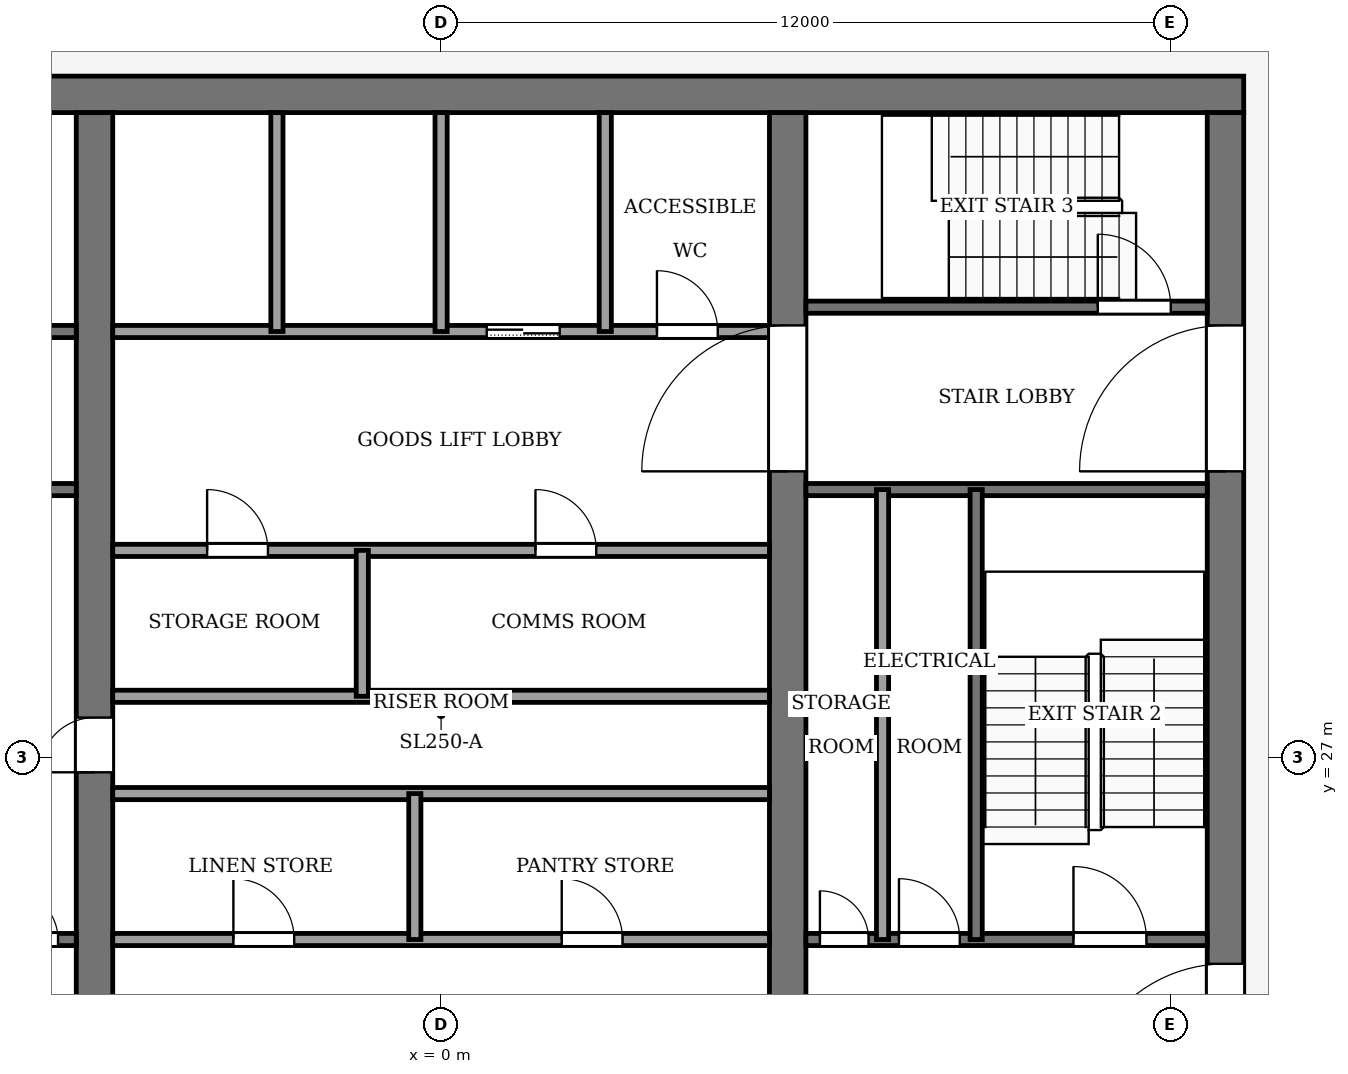
"""IFC4 building model, lengths in metres.
Left out: names, types, materials, properties, quantities, classifications, styles, units other than length and angle.
Written with IfcOpenShell. Run it as: python <this file> out.ifc"""

import sys

from ifc_helpers import new_model, si_unit, direction, frame, frame_2d, origin, place, context, subcontext, project, spatial, rectangle, extrude, element, fill, save


model = new_model("IFC4")
c1 = context("Model", 3, precision=1e-05, world=origin(), true_north=direction((0.0, 1.0)))
c2 = subcontext(c1, "Body", "Model", "MODEL_VIEW")
j1 = project(units=[si_unit("LENGTHUNIT", "METRE"), si_unit("PLANEANGLEUNIT", "RADIAN")], contexts=[c1])
p1 = place(None, origin())
s1 = spatial("IfcSite", under=j1, at=p1, CompositionType="ELEMENT")
p2 = place(p1, origin())
s2 = spatial("IfcBuilding", under=s1, at=p2, CompositionType="ELEMENT")
p3 = place(p2, frame((0.0, 0.0, 322.0)))
s3 = spatial("IfcBuildingStorey", under=s2, at=p3, CompositionType="ELEMENT", Elevation=322.0)
p4 = place(p3, frame((-13.2, 37.9, -0.13), z_axis=(0.0, 0.0, 1.0), x_axis=(1.0, 0.0, 0.0)))
e1 = element("IfcWall", 1, at=p4, inside=s3, PredefinedType="SHEAR", context=c2, shape_type="SweptSolid", body=[
    extrude(rectangle(XDim=26.4, YDim=0.6, at=frame_2d((13.2, 0.0))), origin(), (0.0, 0.0, 1.0), 4.0),
])
p5 = place(p3, frame((12.9, 18.4, -0.13), z_axis=(0.0, 0.0, 1.0), x_axis=(0.0, 1.0, 0.0)))
e2 = element("IfcWall", 2, at=p5, inside=s3, PredefinedType="SHEAR", context=c2, shape_type="SweptSolid", body=[
    extrude(rectangle(XDim=19.2, YDim=0.6, at=frame_2d((9.6, 0.0))), origin(), (0.0, 0.0, 1.0), 4.0),
])
p6 = place(p5, frame((2.8, 0.0, 0.13)))
e3 = element("IfcOpeningElement", 3, at=p6, cuts=e2, PredefinedType="OPENING", context=c2, shape_type="SweptSolid", body=[
    extrude(rectangle(XDim=2.4, YDim=2.4, at=frame_2d((1.2, 1.2))), frame((0.0, 0.31, 0.0), z_axis=(0.0, -1.0, 0.0), x_axis=(1.0, 0.0, 0.0)), (0.0, 0.0, 1.0), 0.62),
])
p7 = place(p5, frame((13.3, 0.0, 0.13)))
e4 = element("IfcOpeningElement", 4, at=p7, cuts=e2, PredefinedType="OPENING", context=c2, shape_type="SweptSolid", body=[
    extrude(rectangle(XDim=2.4, YDim=2.4, at=frame_2d((1.2, 1.2))), frame((0.0, 0.31, 0.0), z_axis=(0.0, -1.0, 0.0), x_axis=(1.0, 0.0, 0.0)), (0.0, 0.0, 1.0), 0.62),
])
p8 = place(p3, frame((-5.7, 18.4, -0.13), z_axis=(0.0, 0.0, 1.0), x_axis=(0.0, 1.0, 0.0)))
e5 = element("IfcWall", 5, at=p8, inside=s3, PredefinedType="SHEAR", context=c2, shape_type="SweptSolid", body=[
    extrude(rectangle(XDim=19.2, YDim=0.6, at=frame_2d((9.6, 0.0))), origin(), (0.0, 0.0, 1.0), 4.0),
])
p9 = place(p8, frame((8.35, 0.0, 0.13)))
e6 = element("IfcOpeningElement", 6, at=p9, cuts=e5, PredefinedType="OPENING", context=c2, shape_type="SweptSolid", body=[
    extrude(rectangle(XDim=0.9, YDim=2.1, at=frame_2d((0.45, 1.05))), frame((0.0, 0.31, 0.0), z_axis=(0.0, -1.0, 0.0), x_axis=(1.0, 0.0, 0.0)), (0.0, 0.0, 1.0), 0.62),
])
p10 = place(p3, frame((5.7, 18.4, -0.13), z_axis=(0.0, 0.0, 1.0), x_axis=(0.0, 1.0, 0.0)))
e7 = element("IfcWall", 7, at=p10, inside=s3, PredefinedType="SHEAR", context=c2, shape_type="SweptSolid", body=[
    extrude(rectangle(XDim=19.2, YDim=0.6, at=frame_2d((9.6, 0.0))), origin(), (0.0, 0.0, 1.0), 4.0),
])
p11 = place(p10, frame((13.3, 0.0, 0.13)))
e8 = element("IfcOpeningElement", 8, at=p11, cuts=e7, PredefinedType="OPENING", context=c2, shape_type="SweptSolid", body=[
    extrude(rectangle(XDim=2.4, YDim=2.4, at=frame_2d((1.2, 1.2))), frame((0.0, 0.31, 0.0), z_axis=(0.0, -1.0, 0.0), x_axis=(1.0, 0.0, 0.0)), (0.0, 0.0, 1.0), 0.62),
])
p12 = place(p3, frame((-12.6, 24.0, 0.0), z_axis=(0.0, 0.0, 1.0), x_axis=(1.0, 0.0, 0.0)))
e9 = element("IfcWall", 9, at=p12, inside=s3, PredefinedType="PARTITIONING", context=c2, shape_type="SweptSolid", body=[
    extrude(rectangle(XDim=6.6, YDim=0.2, at=frame_2d((3.3, 0.0))), origin(), (0.0, 0.0, 1.0), 3.87),
])
p13 = place(p12, frame((4.1, 0.0, 0.0)))
e10 = element("IfcOpeningElement", 10, at=p13, cuts=e9, PredefinedType="OPENING", context=c2, shape_type="SweptSolid", body=[
    extrude(rectangle(XDim=0.8, YDim=2.1, at=frame_2d((0.4, 1.05))), frame((0.0, 0.11, 0.0), z_axis=(0.0, -1.0, 0.0), x_axis=(1.0, 0.0, 0.0)), (0.0, 0.0, 1.0), 0.22),
])
p14 = place(p12, frame((5.5, 0.0, 0.0)))
e11 = element("IfcOpeningElement", 11, at=p14, cuts=e9, PredefinedType="OPENING", context=c2, shape_type="SweptSolid", body=[
    extrude(rectangle(XDim=0.8, YDim=2.1, at=frame_2d((0.4, 1.05))), frame((0.0, 0.11, 0.0), z_axis=(0.0, -1.0, 0.0), x_axis=(1.0, 0.0, 0.0)), (0.0, 0.0, 1.0), 0.22),
])
p15 = place(p3, frame((-5.4, 24.0, 0.0), z_axis=(0.0, 0.0, 1.0), x_axis=(1.0, 0.0, 0.0)))
e12 = element("IfcWall", 12, at=p15, inside=s3, PredefinedType="PARTITIONING", context=c2, shape_type="SweptSolid", body=[
    extrude(rectangle(XDim=10.8, YDim=0.2, at=frame_2d((5.4, 0.0))), origin(), (0.0, 0.0, 1.0), 3.87),
])
p16 = place(p15, frame((1.984, 0.0, 0.0)))
e13 = element("IfcOpeningElement", 13, at=p16, cuts=e12, PredefinedType="OPENING", context=c2, shape_type="SweptSolid", body=[
    extrude(rectangle(XDim=1.0, YDim=2.1, at=frame_2d((0.5, 1.05))), frame((0.0, 0.11, 0.0), z_axis=(0.0, -1.0, 0.0), x_axis=(1.0, 0.0, 0.0)), (0.0, 0.0, 1.0), 0.22),
])
p17 = place(p15, frame((7.384, 0.0, 0.0)))
e14 = element("IfcOpeningElement", 14, at=p17, cuts=e12, PredefinedType="OPENING", context=c2, shape_type="SweptSolid", body=[
    extrude(rectangle(XDim=1.0, YDim=2.1, at=frame_2d((0.5, 1.05))), frame((0.0, 0.11, 0.0), z_axis=(0.0, -1.0, 0.0), x_axis=(1.0, 0.0, 0.0)), (0.0, 0.0, 1.0), 0.22),
])
p18 = place(p3, frame((6.0, 24.0, 0.0), z_axis=(0.0, 0.0, 1.0), x_axis=(1.0, 0.0, 0.0)))
e15 = element("IfcWall", 15, at=p18, inside=s3, PredefinedType="PARTITIONING", context=c2, shape_type="SweptSolid", body=[
    extrude(rectangle(XDim=6.6, YDim=0.2, at=frame_2d((3.3, 0.0))), origin(), (0.0, 0.0, 1.0), 3.87),
])
p19 = place(p18, frame((0.23, 0.0, 0.0)))
e16 = element("IfcOpeningElement", 16, at=p19, cuts=e15, PredefinedType="OPENING", context=c2, shape_type="SweptSolid", body=[
    extrude(rectangle(XDim=0.8, YDim=2.1, at=frame_2d((0.4, 1.05))), frame((0.0, 0.11, 0.0), z_axis=(0.0, -1.0, 0.0), x_axis=(1.0, 0.0, 0.0)), (0.0, 0.0, 1.0), 0.22),
])
p20 = place(p18, frame((1.53, 0.0, 0.0)))
e17 = element("IfcOpeningElement", 17, at=p20, cuts=e15, PredefinedType="OPENING", context=c2, shape_type="SweptSolid", body=[
    extrude(rectangle(XDim=1.0, YDim=2.1, at=frame_2d((0.5, 1.05))), frame((0.0, 0.11, 0.0), z_axis=(0.0, -1.0, 0.0), x_axis=(1.0, 0.0, 0.0)), (0.0, 0.0, 1.0), 0.22),
])
p21 = place(p18, frame((4.4, 0.0, 0.0)))
e18 = element("IfcOpeningElement", 18, at=p21, cuts=e15, PredefinedType="OPENING", context=c2, shape_type="SweptSolid", body=[
    extrude(rectangle(XDim=1.2, YDim=2.2, at=frame_2d((0.6, 1.1))), frame((0.0, 0.11, 0.0), z_axis=(0.0, -1.0, 0.0), x_axis=(1.0, 0.0, 0.0)), (0.0, 0.0, 1.0), 0.22),
])
for number, where, z_axis, x_axis in (
    (19, (-5.4, 26.4, 0.0), (0.0, 0.0, 1.0), (1.0, 0.0, 0.0)),
    (20, (-5.4, 28.0, 0.0), (0.0, 0.0, 1.0), (1.0, 0.0, 0.0)),
):
    element("IfcWall", number, at=place(p3, frame(where, z_axis=z_axis, x_axis=x_axis)), inside=s3, PredefinedType="PARTITIONING", context=c2, shape_type="SweptSolid", body=[
        extrude(rectangle(XDim=10.8, YDim=0.2, at=frame_2d((5.4, 0.0))), origin(), (0.0, 0.0, 1.0), 3.87),
    ])
p22 = place(p3, frame((-5.4, 30.4, 0.0), z_axis=(0.0, 0.0, 1.0), x_axis=(1.0, 0.0, 0.0)))
e21 = element("IfcWall", 21, at=p22, inside=s3, PredefinedType="PARTITIONING", context=c2, shape_type="SweptSolid", body=[
    extrude(rectangle(XDim=10.8, YDim=0.2, at=frame_2d((5.4, 0.0))), origin(), (0.0, 0.0, 1.0), 3.87),
])
p23 = place(p22, frame((1.552, 0.0, 0.0)))
e22 = element("IfcOpeningElement", 22, at=p23, cuts=e21, PredefinedType="OPENING", context=c2, shape_type="SweptSolid", body=[
    extrude(rectangle(XDim=1.0, YDim=2.1, at=frame_2d((0.5, 1.05))), frame((0.0, 0.11, 0.0), z_axis=(0.0, -1.0, 0.0), x_axis=(1.0, 0.0, 0.0)), (0.0, 0.0, 1.0), 0.22),
])
p24 = place(p22, frame((6.952, 0.0, 0.0)))
e23 = element("IfcOpeningElement", 23, at=p24, cuts=e21, PredefinedType="OPENING", context=c2, shape_type="SweptSolid", body=[
    extrude(rectangle(XDim=1.0, YDim=2.1, at=frame_2d((0.5, 1.05))), frame((0.0, 0.11, 0.0), z_axis=(0.0, -1.0, 0.0), x_axis=(1.0, 0.0, 0.0)), (0.0, 0.0, 1.0), 0.22),
])
p25 = place(p3, frame((-12.6, 31.4, 0.0), z_axis=(0.0, 0.0, 1.0), x_axis=(1.0, 0.0, 0.0)))
e24 = element("IfcWall", 24, at=p25, inside=s3, PredefinedType="PARTITIONING", context=c2, shape_type="SweptSolid", body=[
    extrude(rectangle(XDim=6.6, YDim=0.2, at=frame_2d((3.3, 0.0))), origin(), (0.0, 0.0, 1.0), 3.87),
])
p26 = place(p25, frame((1.0, 0.0, 0.0)))
e25 = element("IfcOpeningElement", 25, at=p26, cuts=e24, PredefinedType="OPENING", context=c2, shape_type="SweptSolid", body=[
    extrude(rectangle(XDim=1.2, YDim=2.2, at=frame_2d((0.6, 1.1))), frame((0.0, 0.11, 0.0), z_axis=(0.0, -1.0, 0.0), x_axis=(1.0, 0.0, 0.0)), (0.0, 0.0, 1.0), 0.22),
])
p27 = place(p3, frame((6.0, 31.4, 0.0), z_axis=(0.0, 0.0, 1.0), x_axis=(1.0, 0.0, 0.0)))
e26 = element("IfcWall", 26, at=p27, inside=s3, PredefinedType="PARTITIONING", context=c2, shape_type="SweptSolid", body=[
    extrude(rectangle(XDim=6.6, YDim=0.2, at=frame_2d((3.3, 0.0))), origin(), (0.0, 0.0, 1.0), 3.87),
])
p28 = place(p3, frame((-12.6, 34.0, 0.0), z_axis=(0.0, 0.0, 1.0), x_axis=(1.0, 0.0, 0.0)))
e27 = element("IfcWall", 27, at=p28, inside=s3, PredefinedType="PARTITIONING", context=c2, shape_type="SweptSolid", body=[
    extrude(rectangle(XDim=6.6, YDim=0.2, at=frame_2d((3.3, 0.0))), origin(), (0.0, 0.0, 1.0), 3.87),
])
p29 = place(p28, frame((4.7, 0.0, 0.0)))
e28 = element("IfcOpeningElement", 28, at=p29, cuts=e27, PredefinedType="OPENING", context=c2, shape_type="SweptSolid", body=[
    extrude(rectangle(XDim=1.4, YDim=2.2, at=frame_2d((0.7, 1.1))), frame((0.0, 0.11, 0.0), z_axis=(0.0, -1.0, 0.0), x_axis=(1.0, 0.0, 0.0)), (0.0, 0.0, 1.0), 0.22),
])
p30 = place(p28, frame((2.3, 0.0, 0.0)))
e29 = element("IfcOpeningElement", 29, at=p30, cuts=e27, PredefinedType="OPENING", context=c2, shape_type="SweptSolid", body=[
    extrude(rectangle(XDim=1.4, YDim=2.2, at=frame_2d((0.7, 1.1))), frame((0.0, 0.11, 0.0), z_axis=(0.0, -1.0, 0.0), x_axis=(1.0, 0.0, 0.0)), (0.0, 0.0, 1.0), 0.22),
])
p31 = place(p28, frame((0.45, 0.0, 0.0)))
e30 = element("IfcOpeningElement", 30, at=p31, cuts=e27, PredefinedType="OPENING", context=c2, shape_type="SweptSolid", body=[
    extrude(rectangle(XDim=0.9, YDim=2.1, at=frame_2d((0.45, 1.05))), frame((0.0, 0.11, 0.0), z_axis=(0.0, -1.0, 0.0), x_axis=(1.0, 0.0, 0.0)), (0.0, 0.0, 1.0), 0.22),
])
p32 = place(p3, frame((-5.4, 34.0, 0.0), z_axis=(0.0, 0.0, 1.0), x_axis=(1.0, 0.0, 0.0)))
e31 = element("IfcWall", 31, at=p32, inside=s3, PredefinedType="PARTITIONING", context=c2, shape_type="SweptSolid", body=[
    extrude(rectangle(XDim=10.8, YDim=0.2, at=frame_2d((5.4, 0.0))), origin(), (0.0, 0.0, 1.0), 3.87),
])
p33 = place(p32, frame((6.15, 0.0, 0.0)))
e32 = element("IfcOpeningElement", 32, at=p33, cuts=e31, PredefinedType="OPENING", context=c2, shape_type="SweptSolid", body=[
    extrude(rectangle(XDim=1.2, YDim=2.2, at=frame_2d((0.6, 1.1))), frame((0.0, 0.11, 0.0), z_axis=(0.0, -1.0, 0.0), x_axis=(1.0, 0.0, 0.0)), (0.0, 0.0, 1.0), 0.22),
])
p34 = place(p32, frame((8.95, 0.0, 0.0)))
e33 = element("IfcOpeningElement", 33, at=p34, cuts=e31, PredefinedType="OPENING", context=c2, shape_type="SweptSolid", body=[
    extrude(rectangle(XDim=1.0, YDim=2.1, at=frame_2d((0.5, 1.05))), frame((0.0, 0.11, 0.0), z_axis=(0.0, -1.0, 0.0), x_axis=(1.0, 0.0, 0.0)), (0.0, 0.0, 1.0), 0.22),
])
p35 = place(p3, frame((6.0, 34.4, 0.0), z_axis=(0.0, 0.0, 1.0), x_axis=(1.0, 0.0, 0.0)))
e34 = element("IfcWall", 34, at=p35, inside=s3, PredefinedType="PARTITIONING", context=c2, shape_type="SweptSolid", body=[
    extrude(rectangle(XDim=6.6, YDim=0.2, at=frame_2d((3.3, 0.0))), origin(), (0.0, 0.0, 1.0), 3.87),
])
p36 = place(p35, frame((4.8, 0.0, 0.0)))
e35 = element("IfcOpeningElement", 35, at=p36, cuts=e34, PredefinedType="OPENING", context=c2, shape_type="SweptSolid", body=[
    extrude(rectangle(XDim=1.2, YDim=2.2, at=frame_2d((0.6, 1.1))), frame((0.0, 0.11, 0.0), z_axis=(0.0, -1.0, 0.0), x_axis=(1.0, 0.0, 0.0)), (0.0, 0.0, 1.0), 0.22),
])
p37 = place(p3, frame((-2.7, 34.0, 0.0), z_axis=(0.0, 0.0, 1.0), x_axis=(0.0, 1.0, 0.0)))
e36 = element("IfcWall", 36, at=p37, inside=s3, PredefinedType="PARTITIONING", context=c2, shape_type="SweptSolid", body=[
    extrude(rectangle(XDim=3.6, YDim=0.2, at=frame_2d((1.8, 0.0))), origin(), (0.0, 0.0, 1.0), 3.87),
])
for number, where, z_axis, x_axis in (
    (37, (-1.296, 28.0, 0.0), (0.0, 0.0, 1.0), (0.0, 1.0, 0.0)),
    (38, (-0.432, 24.0, 0.0), (0.0, 0.0, 1.0), (0.0, 1.0, 0.0)),
):
    element("IfcWall", number, at=place(p3, frame(where, z_axis=z_axis, x_axis=x_axis)), inside=s3, PredefinedType="PARTITIONING", context=c2, shape_type="SweptSolid", body=[
        extrude(rectangle(XDim=2.4, YDim=0.2, at=frame_2d((1.2, 0.0))), origin(), (0.0, 0.0, 1.0), 3.87),
    ])
for number, where, z_axis, x_axis in (
    (39, (0.0, 34.0, 0.0), (0.0, 0.0, 1.0), (0.0, 1.0, 0.0)),
    (40, (2.7, 34.0, 0.0), (0.0, 0.0, 1.0), (0.0, 1.0, 0.0)),
):
    element("IfcWall", number, at=place(p3, frame(where, z_axis=z_axis, x_axis=x_axis)), inside=s3, PredefinedType="PARTITIONING", context=c2, shape_type="SweptSolid", body=[
        extrude(rectangle(XDim=3.6, YDim=0.2, at=frame_2d((1.8, 0.0))), origin(), (0.0, 0.0, 1.0), 3.87),
    ])
for number, where, z_axis, x_axis in (
    (41, (7.26, 24.0, 0.0), (0.0, 0.0, 1.0), (0.0, 1.0, 0.0)),
    (42, (8.8, 24.0, 0.0), (0.0, 0.0, 1.0), (0.0, 1.0, 0.0)),
):
    element("IfcWall", number, at=place(p3, frame(where, z_axis=z_axis, x_axis=x_axis)), inside=s3, PredefinedType="PARTITIONING", context=c2, shape_type="SweptSolid", body=[
        extrude(rectangle(XDim=7.4, YDim=0.2, at=frame_2d((3.7, 0.0))), origin(), (0.0, 0.0, 1.0), 3.87),
    ])
p38 = place(p33, origin())
e43 = element("IfcDoor", 43, at=p38, inside=s3, OperationType="SLIDING_TO_LEFT", PredefinedType="DOOR", context=c2, shape_type="SweptSolid", body=[
    extrude(rectangle(XDim=1.2, YDim=2.2, at=frame_2d((0.6, 1.1))), frame((0.0, 0.025, 0.0), z_axis=(0.0, -1.0, 0.0), x_axis=(1.0, 0.0, 0.0)), (0.0, 0.0, 1.0), 0.05),
])
fill(e32, e43)
p39 = place(p16, origin())
e44 = element("IfcDoor", 44, at=p39, inside=s3, OperationType="SINGLE_SWING_LEFT", PredefinedType="DOOR", context=c2, shape_type="SweptSolid", body=[
    extrude(rectangle(XDim=1.0, YDim=2.1, at=frame_2d((0.5, 1.05))), frame((0.0, 0.025, 0.0), z_axis=(0.0, -1.0, 0.0), x_axis=(1.0, 0.0, 0.0)), (0.0, 0.0, 1.0), 0.05),
])
fill(e13, e44)
p40 = place(p17, origin())
e45 = element("IfcDoor", 45, at=p40, inside=s3, OperationType="SINGLE_SWING_RIGHT", PredefinedType="DOOR", context=c2, shape_type="SweptSolid", body=[
    extrude(rectangle(XDim=1.0, YDim=2.1, at=frame_2d((0.5, 1.05))), frame((0.0, 0.025, 0.0), z_axis=(0.0, -1.0, 0.0), x_axis=(1.0, 0.0, 0.0)), (0.0, 0.0, 1.0), 0.05),
])
fill(e14, e45)
p41 = place(p23, origin())
e46 = element("IfcDoor", 46, at=p41, inside=s3, OperationType="SINGLE_SWING_LEFT", PredefinedType="DOOR", context=c2, shape_type="SweptSolid", body=[
    extrude(rectangle(XDim=1.0, YDim=2.1, at=frame_2d((0.5, 1.05))), frame((0.0, 0.025, 0.0), z_axis=(0.0, -1.0, 0.0), x_axis=(1.0, 0.0, 0.0)), (0.0, 0.0, 1.0), 0.05),
])
fill(e22, e46)
p42 = place(p24, origin())
e47 = element("IfcDoor", 47, at=p42, inside=s3, OperationType="SINGLE_SWING_RIGHT", PredefinedType="DOOR", context=c2, shape_type="SweptSolid", body=[
    extrude(rectangle(XDim=1.0, YDim=2.1, at=frame_2d((0.5, 1.05))), frame((0.0, 0.025, 0.0), z_axis=(0.0, -1.0, 0.0), x_axis=(1.0, 0.0, 0.0)), (0.0, 0.0, 1.0), 0.05),
])
fill(e23, e47)
p43 = place(p14, origin())
e48 = element("IfcDoor", 48, at=p43, inside=s3, OperationType="SINGLE_SWING_RIGHT", PredefinedType="DOOR", context=c2, shape_type="SweptSolid", body=[
    extrude(rectangle(XDim=0.8, YDim=2.1, at=frame_2d((0.4, 1.05))), frame((0.0, 0.025, 0.0), z_axis=(0.0, -1.0, 0.0), x_axis=(1.0, 0.0, 0.0)), (0.0, 0.0, 1.0), 0.05),
])
fill(e11, e48)
p44 = place(p19, origin())
e49 = element("IfcDoor", 49, at=p44, inside=s3, OperationType="SINGLE_SWING_RIGHT", PredefinedType="DOOR", context=c2, shape_type="SweptSolid", body=[
    extrude(rectangle(XDim=0.8, YDim=2.1, at=frame_2d((0.4, 1.05))), frame((0.0, 0.025, 0.0), z_axis=(0.0, -1.0, 0.0), x_axis=(1.0, 0.0, 0.0)), (0.0, 0.0, 1.0), 0.05),
])
fill(e16, e49)
p45 = place(p20, origin())
e50 = element("IfcDoor", 50, at=p45, inside=s3, OperationType="SINGLE_SWING_LEFT", PredefinedType="DOOR", context=c2, shape_type="SweptSolid", body=[
    extrude(rectangle(XDim=1.0, YDim=2.1, at=frame_2d((0.5, 1.05))), frame((0.0, 0.025, 0.0), z_axis=(0.0, -1.0, 0.0), x_axis=(1.0, 0.0, 0.0)), (0.0, 0.0, 1.0), 0.05),
])
fill(e17, e50)
p46 = place(p34, origin())
e51 = element("IfcDoor", 51, at=p46, inside=s3, OperationType="SINGLE_SWING_LEFT", PredefinedType="DOOR", context=c2, shape_type="SweptSolid", body=[
    extrude(rectangle(XDim=1.0, YDim=2.1, at=frame_2d((0.5, 1.05))), frame((0.0, 0.025, 0.0), z_axis=(0.0, -1.0, 0.0), x_axis=(1.0, 0.0, 0.0)), (0.0, 0.0, 1.0), 0.05),
])
fill(e33, e51)
p47 = place(p9, origin())
e52 = element("IfcDoor", 52, at=p47, inside=s3, OperationType="SINGLE_SWING_RIGHT", PredefinedType="DOOR", context=c2, shape_type="SweptSolid", body=[
    extrude(rectangle(XDim=0.9, YDim=2.1, at=frame_2d((0.45, 1.05))), frame((0.0, 0.025, 0.0), z_axis=(0.0, -1.0, 0.0), x_axis=(1.0, 0.0, 0.0)), (0.0, 0.0, 1.0), 0.05),
])
fill(e6, e52)
p48 = place(p21, origin())
e53 = element("IfcDoor", 53, at=p48, inside=s3, OperationType="SINGLE_SWING_LEFT", PredefinedType="DOOR", context=c2, shape_type="SweptSolid", body=[
    extrude(rectangle(XDim=1.2, YDim=2.2, at=frame_2d((0.6, 1.1))), frame((0.0, 0.025, 0.0), z_axis=(0.0, -1.0, 0.0), x_axis=(1.0, 0.0, 0.0)), (0.0, 0.0, 1.0), 0.05),
])
fill(e18, e53)
p49 = place(p36, origin())
e54 = element("IfcDoor", 54, at=p49, inside=s3, OperationType="SINGLE_SWING_RIGHT", PredefinedType="DOOR", context=c2, shape_type="SweptSolid", body=[
    extrude(rectangle(XDim=1.2, YDim=2.2, at=frame_2d((0.6, 1.1))), frame((0.0, 0.025, 0.0), z_axis=(0.0, -1.0, 0.0), x_axis=(1.0, 0.0, 0.0)), (0.0, 0.0, 1.0), 0.05),
])
fill(e35, e54)
p50 = place(p11, origin())
e55 = element("IfcDoor", 55, at=p50, inside=s3, OperationType="DOUBLE_DOOR_SINGLE_SWING", PredefinedType="DOOR", context=c2, shape_type="SweptSolid", body=[
    extrude(rectangle(XDim=2.4, YDim=2.4, at=frame_2d((1.2, 1.2))), frame((0.0, 0.025, 0.0), z_axis=(0.0, -1.0, 0.0), x_axis=(1.0, 0.0, 0.0)), (0.0, 0.0, 1.0), 0.05),
])
fill(e8, e55)
p51 = place(p6, origin())
e56 = element("IfcDoor", 56, at=p51, inside=s3, OperationType="DOUBLE_DOOR_SINGLE_SWING", PredefinedType="DOOR", context=c2, shape_type="SweptSolid", body=[
    extrude(rectangle(XDim=2.4, YDim=2.4, at=frame_2d((1.2, 1.2))), frame((0.0, 0.025, 0.0), z_axis=(0.0, -1.0, 0.0), x_axis=(1.0, 0.0, 0.0)), (0.0, 0.0, 1.0), 0.05),
])
fill(e3, e56)
p52 = place(p7, origin())
e57 = element("IfcDoor", 57, at=p52, inside=s3, OperationType="DOUBLE_DOOR_SINGLE_SWING", PredefinedType="DOOR", context=c2, shape_type="SweptSolid", body=[
    extrude(rectangle(XDim=2.4, YDim=2.4, at=frame_2d((1.2, 1.2))), frame((0.0, 0.025, 0.0), z_axis=(0.0, -1.0, 0.0), x_axis=(1.0, 0.0, 0.0)), (0.0, 0.0, 1.0), 0.05),
])
fill(e4, e57)
save(model, sys.argv[1])
